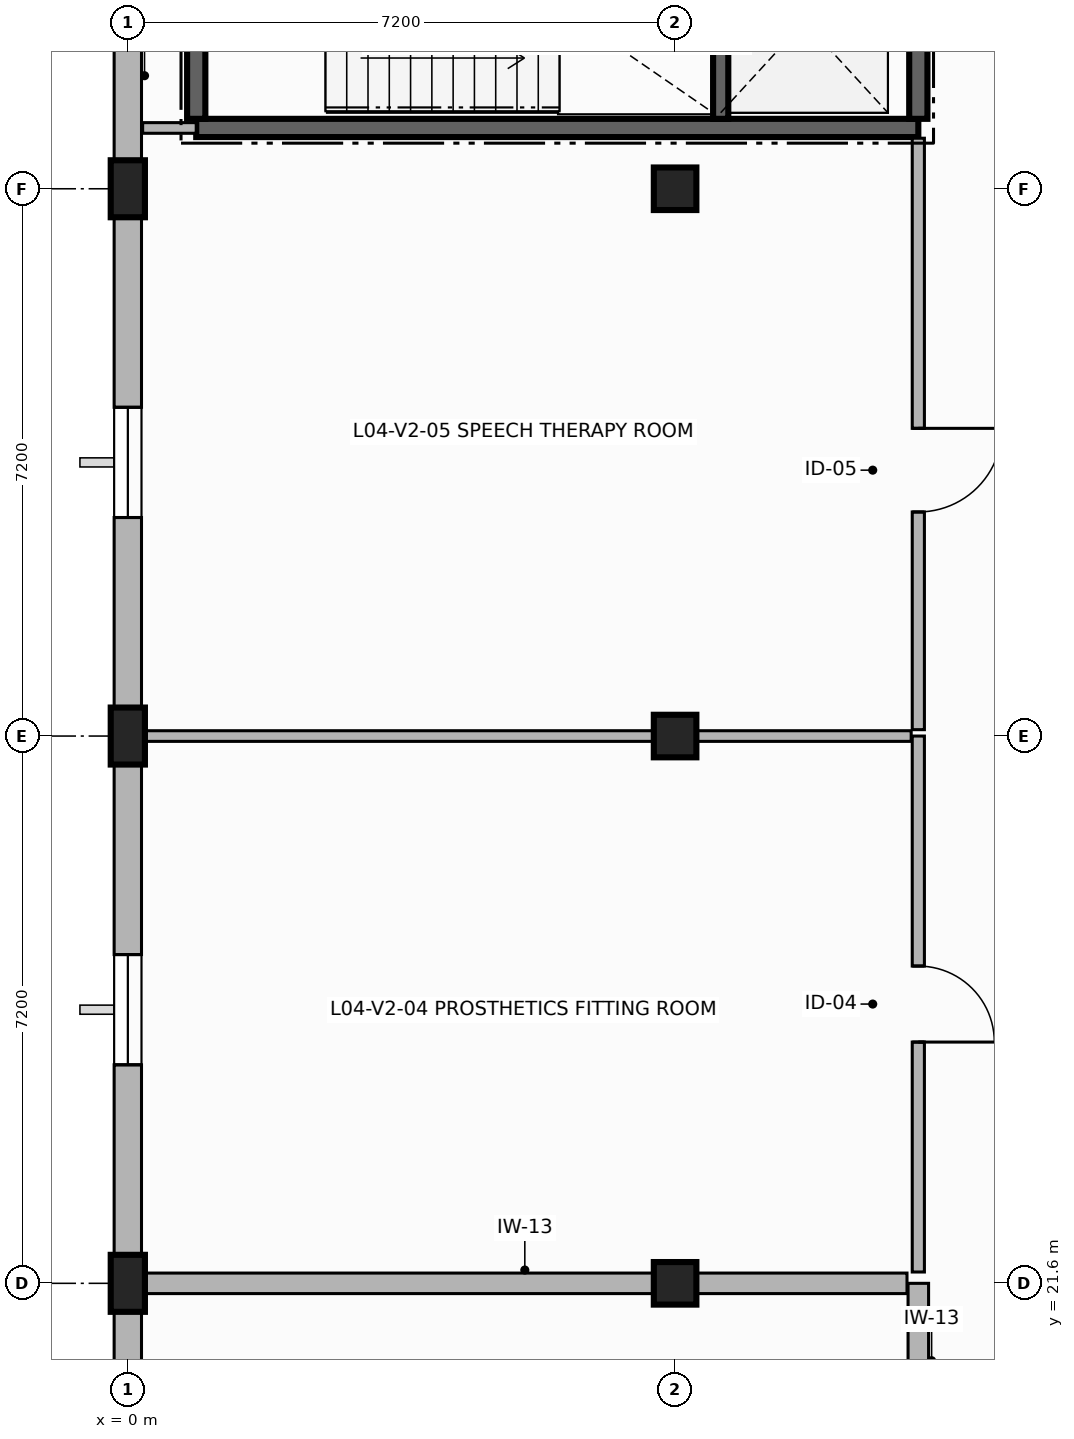
"""IFC4 building model, lengths in metres.
Left out: names, types, materials, properties, quantities, classifications, styles, units other than length and angle.
Written with IfcOpenShell. Run it as: python <this file> out.ifc"""

import sys

from ifc_helpers import new_model, si_unit, direction, frame, frame_2d, origin, origin_2d, place, context, subcontext, project, spatial, rectangle, extrude, element, fill, save


model = new_model("IFC4")
c1 = context("Model", 3, precision=1e-05, world=origin(), true_north=direction((0.0, 1.0)))
c2 = subcontext(c1, "Body", "Model", "MODEL_VIEW")
j1 = project(units=[si_unit("LENGTHUNIT", "METRE"), si_unit("PLANEANGLEUNIT", "RADIAN")], contexts=[c1])
p1 = place(None, origin())
s1 = spatial("IfcSite", under=j1, at=p1, CompositionType="ELEMENT")
p2 = place(p1, origin())
s2 = spatial("IfcBuilding", under=s1, at=p2, CompositionType="ELEMENT")
p3 = place(p2, frame((0.0, 0.0, 16.0)))
s3 = spatial("IfcBuildingStorey", under=s2, at=p3, CompositionType="ELEMENT", Elevation=16.0)
for number, where, z_axis, x_axis in (
    (1, (0.0, 21.6, 0.0), (0.0, 0.0, 1.0), (1.0, 0.0, 0.0)),
    (2, (0.0, 28.8, 0.0), (0.0, 0.0, 1.0), (1.0, 0.0, 0.0)),
    (3, (0.0, 36.0, 0.0), (0.0, 0.0, 1.0), (1.0, 0.0, 0.0)),
):
    element("IfcColumn", number, at=place(p3, frame(where, z_axis=z_axis, x_axis=x_axis)), inside=s3, PredefinedType="PILASTER", context=c2, shape_type="SweptSolid", body=[
        extrude(rectangle(XDim=0.45, YDim=0.75, at=origin_2d()), origin(), (0.0, 0.0, 1.0), 3.42),
    ])
for number, where, z_axis, x_axis in (
    (4, (7.2, 21.6, 0.0), (0.0, 0.0, 1.0), (1.0, 0.0, 0.0)),
    (5, (7.2, 28.8, 0.0), (0.0, 0.0, 1.0), (1.0, 0.0, 0.0)),
    (6, (7.2, 36.0, 0.0), (0.0, 0.0, 1.0), (1.0, 0.0, 0.0)),
):
    element("IfcColumn", number, at=place(p3, frame(where, z_axis=z_axis, x_axis=x_axis)), inside=s3, PredefinedType="COLUMN", context=c2, shape_type="SweptSolid", body=[
        extrude(rectangle(XDim=0.56, YDim=0.56, at=origin_2d()), origin(), (0.0, 0.0, 1.0), 3.42),
    ])
p4 = place(p3, frame((0.0, 43.2, 0.0), z_axis=(0.0, 0.0, 1.0), x_axis=(0.0, -1.0, 0.0)))
e7 = element("IfcWall", 7, at=p4, inside=s3, PredefinedType="SOLIDWALL", context=c2, shape_type="SweptSolid", body=[
    extrude(rectangle(XDim=7.2, YDim=0.36, at=frame_2d((3.6, 0.0))), origin(), (0.0, 0.0, 1.0), 2.8),
])
p5 = place(p4, frame((2.775, 0.0, 0.85)))
e8 = element("IfcOpeningElement", 8, at=p5, cuts=e7, PredefinedType="OPENING", context=c2, shape_type="SweptSolid", body=[
    extrude(rectangle(XDim=1.45, YDim=1.75, at=frame_2d((0.725, 0.875))), frame((0.0, 0.19, 0.0), z_axis=(0.0, -1.0, 0.0), x_axis=(1.0, 0.0, 0.0)), (0.0, 0.0, 1.0), 0.38),
])
p6 = place(p3, frame((0.0, 36.0, 0.0), z_axis=(0.0, 0.0, 1.0), x_axis=(0.0, -1.0, 0.0)))
e9 = element("IfcWall", 9, at=p6, inside=s3, PredefinedType="SOLIDWALL", context=c2, shape_type="SweptSolid", body=[
    extrude(rectangle(XDim=7.2, YDim=0.36, at=frame_2d((3.6, 0.0))), origin(), (0.0, 0.0, 1.0), 2.8),
])
p7 = place(p6, frame((2.875, 0.0, 0.85)))
e10 = element("IfcOpeningElement", 10, at=p7, cuts=e9, PredefinedType="OPENING", context=c2, shape_type="SweptSolid", body=[
    extrude(rectangle(XDim=1.45, YDim=1.75, at=frame_2d((0.725, 0.875))), frame((0.0, 0.19, 0.0), z_axis=(0.0, -1.0, 0.0), x_axis=(1.0, 0.0, 0.0)), (0.0, 0.0, 1.0), 0.38),
])
p8 = place(p3, frame((0.0, 28.8, 0.0), z_axis=(0.0, 0.0, 1.0), x_axis=(0.0, -1.0, 0.0)))
e11 = element("IfcWall", 11, at=p8, inside=s3, PredefinedType="SOLIDWALL", context=c2, shape_type="SweptSolid", body=[
    extrude(rectangle(XDim=7.2, YDim=0.36, at=frame_2d((3.6, 0.0))), origin(), (0.0, 0.0, 1.0), 2.8),
])
p9 = place(p8, frame((2.875, 0.0, 0.85)))
e12 = element("IfcOpeningElement", 12, at=p9, cuts=e11, PredefinedType="OPENING", context=c2, shape_type="SweptSolid", body=[
    extrude(rectangle(XDim=1.45, YDim=1.75, at=frame_2d((0.725, 0.875))), frame((0.0, 0.19, 0.0), z_axis=(0.0, -1.0, 0.0), x_axis=(1.0, 0.0, 0.0)), (0.0, 0.0, 1.0), 0.38),
])
p10 = place(p3, frame((0.0, 21.6, 0.0), z_axis=(0.0, 0.0, 1.0), x_axis=(0.0, -1.0, 0.0)))
e13 = element("IfcWall", 13, at=p10, inside=s3, PredefinedType="SOLIDWALL", context=c2, shape_type="SweptSolid", body=[
    extrude(rectangle(XDim=7.2, YDim=0.36, at=frame_2d((3.6, 0.0))), origin(), (0.0, 0.0, 1.0), 2.8),
])
p11 = place(p10, frame((1.075, 0.0, 0.85)))
e14 = element("IfcOpeningElement", 14, at=p11, cuts=e13, PredefinedType="OPENING", context=c2, shape_type="SweptSolid", body=[
    extrude(rectangle(XDim=1.45, YDim=1.75, at=frame_2d((0.725, 0.875))), frame((0.0, 0.19, 0.0), z_axis=(0.0, -1.0, 0.0), x_axis=(1.0, 0.0, 0.0)), (0.0, 0.0, 1.0), 0.38),
])
p12 = place(p3, frame((0.9, 36.8, 0.0), z_axis=(0.0, 0.0, 1.0), x_axis=(1.0, 0.0, 0.0)))
e15 = element("IfcWall", 15, at=p12, inside=s3, PredefinedType="SHEAR", context=c2, shape_type="SweptSolid", body=[
    extrude(rectangle(XDim=9.5, YDim=0.24, at=frame_2d((4.75, 0.0))), origin(), (0.0, 0.0, 1.0), 3.42),
])
p13 = place(p3, frame((10.4, 36.92, 0.0), z_axis=(0.0, 0.0, 1.0), x_axis=(0.0, 1.0, 0.0)))
e16 = element("IfcWall", 16, at=p13, inside=s3, PredefinedType="SHEAR", context=c2, shape_type="SweptSolid", body=[
    extrude(rectangle(XDim=5.56, YDim=0.24, at=frame_2d((2.78, 0.0))), origin(), (0.0, 0.0, 1.0), 3.42),
])
p14 = place(p13, frame((4.09, 0.0, 0.0)))
e17 = element("IfcOpeningElement", 17, at=p14, cuts=e16, PredefinedType="OPENING", context=c2, shape_type="SweptSolid", body=[
    extrude(rectangle(XDim=1.15, YDim=2.2, at=frame_2d((0.575, 1.1))), frame((0.0, 0.13, 0.0), z_axis=(0.0, -1.0, 0.0), x_axis=(1.0, 0.0, 0.0)), (0.0, 0.0, 1.0), 0.26),
])
p15 = place(p3, frame((0.9, 42.48, 0.0), z_axis=(0.0, 0.0, 1.0), x_axis=(0.0, -1.0, 0.0)))
e18 = element("IfcWall", 18, at=p15, inside=s3, PredefinedType="SHEAR", context=c2, shape_type="SweptSolid", body=[
    extrude(rectangle(XDim=5.56, YDim=0.24, at=frame_2d((2.78, 0.0))), origin(), (0.0, 0.0, 1.0), 3.42),
])
p16 = place(p3, frame((7.8, 36.92, 0.0), z_axis=(0.0, 0.0, 1.0), x_axis=(0.0, 1.0, 0.0)))
e19 = element("IfcWall", 19, at=p16, inside=s3, PredefinedType="SHEAR", context=c2, shape_type="SweptSolid", body=[
    extrude(rectangle(XDim=3.68, YDim=0.2, at=frame_2d((1.84, 0.0))), origin(), (0.0, 0.0, 1.0), 3.42),
])
p17 = place(p3, frame((10.4, 21.6, 0.0), z_axis=(0.0, 0.0, 1.0), x_axis=(0.0, -1.0, 0.0)))
e20 = element("IfcWall", 20, at=p17, inside=s3, PredefinedType="PARTITIONING", context=c2, shape_type="SweptSolid", body=[
    extrude(rectangle(XDim=3.516, YDim=0.27, at=frame_2d((1.758, 0.0))), origin(), (0.0, 0.0, 1.0), 2.78),
])
p18 = place(p17, frame((2.036, 0.0, 0.0)))
e21 = element("IfcOpeningElement", 21, at=p18, cuts=e20, PredefinedType="OPENING", context=c2, shape_type="SweptSolid", body=[
    extrude(rectangle(XDim=1.0, YDim=2.15, at=frame_2d((0.5, 1.075))), frame((0.0, 0.145, 0.0), z_axis=(0.0, -1.0, 0.0), x_axis=(1.0, 0.0, 0.0)), (0.0, 0.0, 1.0), 0.29),
])
p19 = place(p3, frame((0.195, 21.6, 0.0), z_axis=(0.0, 0.0, 1.0), x_axis=(1.0, 0.0, 0.0)))
e22 = element("IfcWall", 22, at=p19, inside=s3, PredefinedType="PARTITIONING", context=c2, shape_type="SweptSolid", body=[
    extrude(rectangle(XDim=10.056, YDim=0.27, at=frame_2d((5.028, 0.0))), origin(), (0.0, 0.0, 1.0), 2.78),
])
p20 = place(p3, frame((10.4, 28.8, 0.0), z_axis=(0.0, 0.0, 1.0), x_axis=(0.0, -1.0, 0.0)))
e23 = element("IfcWall", 23, at=p20, inside=s3, PredefinedType="PARTITIONING", context=c2, shape_type="SweptSolid", body=[
    extrude(rectangle(XDim=7.051, YDim=0.16, at=frame_2d((3.525, 0.0))), origin(), (0.0, 0.0, 1.0), 2.78),
])
p21 = place(p20, frame((3.026, 0.0, 0.0)))
e24 = element("IfcOpeningElement", 24, at=p21, cuts=e23, PredefinedType="OPENING", context=c2, shape_type="SweptSolid", body=[
    extrude(rectangle(XDim=1.0, YDim=2.15, at=frame_2d((0.5, 1.075))), frame((0.0, 0.09, 0.0), z_axis=(0.0, -1.0, 0.0), x_axis=(1.0, 0.0, 0.0)), (0.0, 0.0, 1.0), 0.18),
])
p22 = place(p3, frame((0.195, 28.8, 0.0), z_axis=(0.0, 0.0, 1.0), x_axis=(1.0, 0.0, 0.0)))
e25 = element("IfcWall", 25, at=p22, inside=s3, PredefinedType="PARTITIONING", context=c2, shape_type="SweptSolid", body=[
    extrude(rectangle(XDim=10.111, YDim=0.14, at=frame_2d((5.055, 0.0))), origin(), (0.0, 0.0, 1.0), 2.78),
])
p23 = place(p3, frame((10.4, 36.665, 0.0), z_axis=(0.0, 0.0, 1.0), x_axis=(0.0, -1.0, 0.0)))
e26 = element("IfcWall", 26, at=p23, inside=s3, PredefinedType="PARTITIONING", context=c2, shape_type="SweptSolid", body=[
    extrude(rectangle(XDim=7.781, YDim=0.16, at=frame_2d((3.891, 0.0))), origin(), (0.0, 0.0, 1.0), 2.78),
])
p24 = place(p23, frame((3.817, 0.0, 0.0)))
e27 = element("IfcOpeningElement", 27, at=p24, cuts=e26, PredefinedType="OPENING", context=c2, shape_type="SweptSolid", body=[
    extrude(rectangle(XDim=1.1, YDim=2.2, at=frame_2d((0.55, 1.1))), frame((0.0, 0.09, 0.0), z_axis=(0.0, -1.0, 0.0), x_axis=(1.0, 0.0, 0.0)), (0.0, 0.0, 1.0), 0.18),
])
p25 = place(p3, frame((0.195, 36.8, 0.0), z_axis=(0.0, 0.0, 1.0), x_axis=(1.0, 0.0, 0.0)))
e28 = element("IfcWall", 28, at=p25, inside=s3, PredefinedType="PARTITIONING", context=c2, shape_type="SweptSolid", body=[
    extrude(rectangle(XDim=0.705, YDim=0.14, at=frame_2d((0.353, 0.0))), origin(), (0.0, 0.0, 1.0), 2.78),
])
p26 = place(p7, origin())
e29 = element("IfcWindow", 29, at=p26, inside=s3, PartitioningType="SINGLE_PANEL", PredefinedType="WINDOW", context=c2, shape_type="SweptSolid", body=[
    extrude(rectangle(XDim=1.45, YDim=1.75, at=frame_2d((0.725, 0.875))), frame((0.0, 0.03, 0.0), z_axis=(0.0, -1.0, 0.0), x_axis=(1.0, 0.0, 0.0)), (0.0, 0.0, 1.0), 0.06),
])
fill(e10, e29)
p27 = place(p9, origin())
e30 = element("IfcWindow", 30, at=p27, inside=s3, PartitioningType="SINGLE_PANEL", PredefinedType="WINDOW", context=c2, shape_type="SweptSolid", body=[
    extrude(rectangle(XDim=1.45, YDim=1.75, at=frame_2d((0.725, 0.875))), frame((0.0, 0.03, 0.0), z_axis=(0.0, -1.0, 0.0), x_axis=(1.0, 0.0, 0.0)), (0.0, 0.0, 1.0), 0.06),
])
fill(e12, e30)
p28 = place(p21, origin())
e31 = element("IfcDoor", 31, at=p28, inside=s3, OperationType="SINGLE_SWING_RIGHT", PredefinedType="DOOR", context=c2, shape_type="SweptSolid", body=[
    extrude(rectangle(XDim=1.0, YDim=2.15, at=frame_2d((0.5, 1.075))), frame((0.0, 0.025, 0.0), z_axis=(0.0, -1.0, 0.0), x_axis=(1.0, 0.0, 0.0)), (0.0, 0.0, 1.0), 0.05),
])
fill(e24, e31)
p29 = place(p24, origin())
e32 = element("IfcDoor", 32, at=p29, inside=s3, OperationType="SINGLE_SWING_LEFT", PredefinedType="DOOR", context=c2, shape_type="SweptSolid", body=[
    extrude(rectangle(XDim=1.1, YDim=2.2, at=frame_2d((0.55, 1.1))), frame((0.0, 0.025, 0.0), z_axis=(0.0, -1.0, 0.0), x_axis=(1.0, 0.0, 0.0)), (0.0, 0.0, 1.0), 0.05),
])
fill(e27, e32)
save(model, sys.argv[1])
